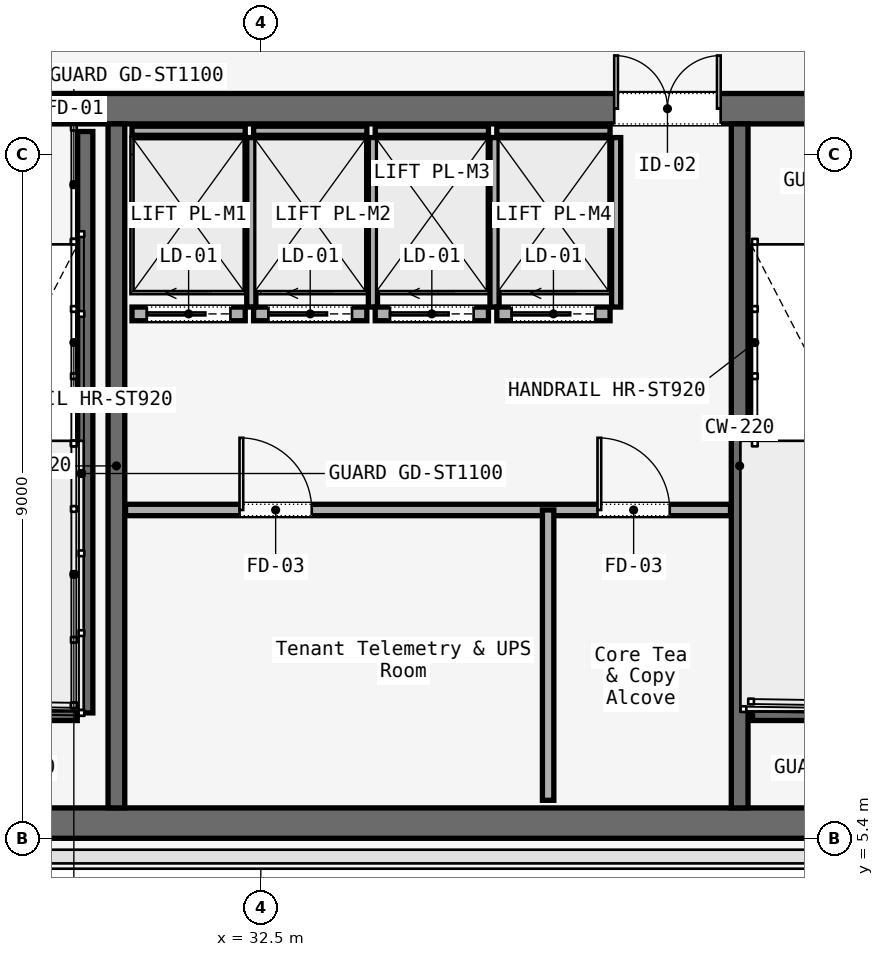
"""IFC4 building model, lengths in metres.
Left out: names, types, materials, properties, quantities, classifications, styles, units other than length and angle.
Written with IfcOpenShell. Run it as: python <this file> out.ifc"""

import sys

from ifc_helpers import new_model, si_unit, direction, frame, frame_2d, origin, place, context, subcontext, project, spatial, rectangle, extrude, element, fill, save


model = new_model("IFC4")
c1 = context("Model", 3, precision=1e-05, world=origin(), true_north=direction((0.0, 1.0)))
c2 = subcontext(c1, "Body", "Model", "MODEL_VIEW")
j1 = project(units=[si_unit("LENGTHUNIT", "METRE"), si_unit("PLANEANGLEUNIT", "RADIAN")], contexts=[c1])
p1 = place(None, origin())
s1 = spatial("IfcSite", under=j1, at=p1, CompositionType="ELEMENT")
p2 = place(p1, origin())
s2 = spatial("IfcBuilding", under=s1, at=p2, CompositionType="ELEMENT")
p3 = place(p2, frame((0.0, 0.0, 180.2)))
s3 = spatial("IfcBuildingStorey", under=s2, at=p3, CompositionType="ELEMENT", Elevation=180.2)
p4 = place(p3, frame((26.45, 15.0, 0.0), z_axis=(0.0, 0.0, 1.0), x_axis=(1.0, 0.0, 0.0)))
e1 = element("IfcWall", 1, at=p4, inside=s3, PredefinedType="SOLIDWALL", context=c2, shape_type="SweptSolid", body=[
    extrude(rectangle(XDim=31.1, YDim=0.4, at=frame_2d((15.55, 0.0))), origin(), (0.0, 0.0, 1.0), 3.58),
])
p5 = place(p4, frame((1.65, 0.0, 0.0)))
e2 = element("IfcOpeningElement", 2, at=p5, cuts=e1, PredefinedType="OPENING", context=c2, shape_type="SweptSolid", body=[
    extrude(rectangle(XDim=1.1, YDim=2.2, at=frame_2d((0.55, 1.1))), frame((0.0, 0.2, 0.0), z_axis=(0.0, -1.0, 0.0), x_axis=(1.0, 0.0, 0.0)), (0.0, 0.0, 1.0), 0.4),
])
p6 = place(p4, frame((13.65, 0.0, 0.0)))
e3 = element("IfcOpeningElement", 3, at=p6, cuts=e1, PredefinedType="OPENING", context=c2, shape_type="SweptSolid", body=[
    extrude(rectangle(XDim=1.1, YDim=2.2, at=frame_2d((0.55, 1.1))), frame((0.0, 0.2, 0.0), z_axis=(0.0, -1.0, 0.0), x_axis=(1.0, 0.0, 0.0)), (0.0, 0.0, 1.0), 0.4),
])
p7 = place(p4, frame((25.55, 0.0, 0.0)))
e4 = element("IfcOpeningElement", 4, at=p7, cuts=e1, PredefinedType="OPENING", context=c2, shape_type="SweptSolid", body=[
    extrude(rectangle(XDim=1.1, YDim=2.2, at=frame_2d((0.55, 1.1))), frame((0.0, 0.2, 0.0), z_axis=(0.0, -1.0, 0.0), x_axis=(1.0, 0.0, 0.0)), (0.0, 0.0, 1.0), 0.4),
])
p8 = place(p4, frame((10.7, 0.0, 0.0)))
e5 = element("IfcOpeningElement", 5, at=p8, cuts=e1, PredefinedType="OPENING", context=c2, shape_type="SweptSolid", body=[
    extrude(rectangle(XDim=1.4, YDim=2.2, at=frame_2d((0.7, 1.1))), frame((0.0, 0.2, 0.0), z_axis=(0.0, -1.0, 0.0), x_axis=(1.0, 0.0, 0.0)), (0.0, 0.0, 1.0), 0.4),
])
p9 = place(p4, frame((19.35, 0.0, 0.0)))
e6 = element("IfcOpeningElement", 6, at=p9, cuts=e1, PredefinedType="OPENING", context=c2, shape_type="SweptSolid", body=[
    extrude(rectangle(XDim=1.1, YDim=2.2, at=frame_2d((0.55, 1.1))), frame((0.0, 0.2, 0.0), z_axis=(0.0, -1.0, 0.0), x_axis=(1.0, 0.0, 0.0)), (0.0, 0.0, 1.0), 0.4),
])
p10 = place(p4, frame((21.4, 0.0, 0.0)))
e7 = element("IfcOpeningElement", 7, at=p10, cuts=e1, PredefinedType="OPENING", context=c2, shape_type="SweptSolid", body=[
    extrude(rectangle(XDim=0.9, YDim=2.1, at=frame_2d((0.45, 1.05))), frame((0.0, 0.2, 0.0), z_axis=(0.0, -1.0, 0.0), x_axis=(1.0, 0.0, 0.0)), (0.0, 0.0, 1.0), 0.4),
])
p11 = place(p4, frame((23.35, 0.0, 0.0)))
e8 = element("IfcOpeningElement", 8, at=p11, cuts=e1, PredefinedType="OPENING", context=c2, shape_type="SweptSolid", body=[
    extrude(rectangle(XDim=1.3, YDim=2.3, at=frame_2d((0.65, 1.15))), frame((0.0, 0.2, 0.0), z_axis=(0.0, -1.0, 0.0), x_axis=(1.0, 0.0, 0.0)), (0.0, 0.0, 1.0), 0.4),
])
p12 = place(p3, frame((26.45, 5.6, 0.0), z_axis=(0.0, 0.0, 1.0), x_axis=(1.0, 0.0, 0.0)))
e9 = element("IfcWall", 9, at=p12, inside=s3, PredefinedType="SOLIDWALL", context=c2, shape_type="SweptSolid", body=[
    extrude(rectangle(XDim=31.1, YDim=0.4, at=frame_2d((15.55, 0.0))), origin(), (0.0, 0.0, 1.0), 3.58),
])
for number, where, z_axis, x_axis in (
    (10, (30.6, 5.8, 0.0), (0.0, 0.0, 1.0), (0.0, 1.0, 0.0)),
    (11, (38.8, 5.8, 0.0), (0.0, 0.0, 1.0), (0.0, 1.0, 0.0)),
):
    element("IfcWall", number, at=place(p3, frame(where, z_axis=z_axis, x_axis=x_axis)), inside=s3, PredefinedType="SOLIDWALL", context=c2, shape_type="SweptSolid", body=[
        extrude(rectangle(XDim=9.0, YDim=0.22, at=frame_2d((4.5, 0.0))), origin(), (0.0, 0.0, 1.0), 3.58),
    ])
p13 = place(p3, frame((30.19, 14.7, 0.0), z_axis=(0.0, 0.0, 1.0), x_axis=(0.0, -1.0, 0.0)))
e12 = element("IfcWall", 12, at=p13, inside=s3, PredefinedType="SOLIDWALL", context=c2, shape_type="SweptSolid", body=[
    extrude(rectangle(XDim=7.65, YDim=0.2, at=frame_2d((3.825, 0.0))), origin(), (0.0, 0.0, 1.0), 3.8),
])
for number, where, z_axis, x_axis in (
    (13, (26.97, 7.05, 0.0), (0.0, 0.0, 1.0), (1.0, 0.0, 0.0)),
    (14, (38.97, 7.05, 0.0), (0.0, 0.0, 1.0), (1.0, 0.0, 0.0)),
):
    element("IfcWall", number, at=place(p3, frame(where, z_axis=z_axis, x_axis=x_axis)), inside=s3, PredefinedType="SOLIDWALL", context=c2, shape_type="SweptSolid", body=[
        extrude(rectangle(XDim=3.115, YDim=0.2, at=frame_2d((1.558, 0.0))), origin(), (0.0, 0.0, 1.0), 3.8),
    ])
p14 = place(p3, frame((30.72, 9.72, 0.0), z_axis=(0.0, 0.0, 1.0), x_axis=(1.0, 0.0, 0.0)))
e15 = element("IfcWall", 15, at=p14, inside=s3, PredefinedType="PARTITIONING", context=c2, shape_type="SweptSolid", body=[
    extrude(rectangle(XDim=7.96, YDim=0.15, at=frame_2d((3.98, 0.0))), origin(), (0.0, 0.0, 1.0), 3.01),
])
p15 = place(p14, frame((1.5, 0.0, 0.0)))
e16 = element("IfcOpeningElement", 16, at=p15, cuts=e15, PredefinedType="OPENING", context=c2, shape_type="SweptSolid", body=[
    extrude(rectangle(XDim=0.95, YDim=2.2, at=frame_2d((0.475, 1.1))), frame((0.0, 0.075, 0.0), z_axis=(0.0, -1.0, 0.0), x_axis=(1.0, 0.0, 0.0)), (0.0, 0.0, 1.0), 0.15),
])
p16 = place(p14, frame((6.21, 0.0, 0.0)))
e17 = element("IfcOpeningElement", 17, at=p16, cuts=e15, PredefinedType="OPENING", context=c2, shape_type="SweptSolid", body=[
    extrude(rectangle(XDim=0.95, YDim=2.2, at=frame_2d((0.475, 1.1))), frame((0.0, 0.075, 0.0), z_axis=(0.0, -1.0, 0.0), x_axis=(1.0, 0.0, 0.0)), (0.0, 0.0, 1.0), 0.15),
])
p17 = place(p3, frame((36.28, 5.9, 0.0), z_axis=(0.0, 0.0, 1.0), x_axis=(0.0, 1.0, 0.0)))
e18 = element("IfcWall", 18, at=p17, inside=s3, PredefinedType="PARTITIONING", context=c2, shape_type="SweptSolid", body=[
    extrude(rectangle(XDim=3.82, YDim=0.15, at=frame_2d((1.91, 0.0))), origin(), (0.0, 0.0, 1.0), 3.01),
])
p18 = place(p3, frame((30.805, 12.3, 0.0), z_axis=(0.0, 0.0, 1.0), x_axis=(1.0, 0.0, 0.0)))
e19 = element("IfcWall", 19, at=p18, inside=s3, PredefinedType="SOLIDWALL", context=c2, shape_type="SweptSolid", body=[
    extrude(rectangle(XDim=1.49, YDim=0.18, at=frame_2d((0.745, 0.0))), origin(), (0.0, 0.0, 1.0), 3.01),
])
p19 = place(p18, frame((0.195, 0.0, 0.0)))
e20 = element("IfcOpeningElement", 20, at=p19, cuts=e19, PredefinedType="OPENING", context=c2, shape_type="SweptSolid", body=[
    extrude(rectangle(XDim=1.1, YDim=2.2, at=frame_2d((0.55, 1.1))), frame((0.0, 0.09, 0.0), z_axis=(0.0, -1.0, 0.0), x_axis=(1.0, 0.0, 0.0)), (0.0, 0.0, 1.0), 0.18),
])
p20 = place(p3, frame((30.805, 14.71, 0.0), z_axis=(0.0, 0.0, 1.0), x_axis=(1.0, 0.0, 0.0)))
e21 = element("IfcWall", 21, at=p20, inside=s3, PredefinedType="SOLIDWALL", context=c2, shape_type="SweptSolid", body=[
    extrude(rectangle(XDim=1.49, YDim=0.12, at=frame_2d((0.745, 0.0))), origin(), (0.0, 0.0, 1.0), 3.01),
])
p21 = place(p3, frame((32.375, 12.39, 0.0), z_axis=(0.0, 0.0, 1.0), x_axis=(0.0, 1.0, 0.0)))
e22 = element("IfcWall", 22, at=p21, inside=s3, PredefinedType="SOLIDWALL", context=c2, shape_type="SweptSolid", body=[
    extrude(rectangle(XDim=2.23, YDim=0.12, at=frame_2d((1.115, 0.0))), origin(), (0.0, 0.0, 1.0), 3.01),
])
p22 = place(p3, frame((32.405, 12.3, 0.0), z_axis=(0.0, 0.0, 1.0), x_axis=(1.0, 0.0, 0.0)))
e23 = element("IfcWall", 23, at=p22, inside=s3, PredefinedType="SOLIDWALL", context=c2, shape_type="SweptSolid", body=[
    extrude(rectangle(XDim=1.49, YDim=0.18, at=frame_2d((0.745, 0.0))), origin(), (0.0, 0.0, 1.0), 3.01),
])
p23 = place(p22, frame((0.195, 0.0, 0.0)))
e24 = element("IfcOpeningElement", 24, at=p23, cuts=e23, PredefinedType="OPENING", context=c2, shape_type="SweptSolid", body=[
    extrude(rectangle(XDim=1.1, YDim=2.2, at=frame_2d((0.55, 1.1))), frame((0.0, 0.09, 0.0), z_axis=(0.0, -1.0, 0.0), x_axis=(1.0, 0.0, 0.0)), (0.0, 0.0, 1.0), 0.18),
])
p24 = place(p3, frame((32.405, 14.71, 0.0), z_axis=(0.0, 0.0, 1.0), x_axis=(1.0, 0.0, 0.0)))
e25 = element("IfcWall", 25, at=p24, inside=s3, PredefinedType="SOLIDWALL", context=c2, shape_type="SweptSolid", body=[
    extrude(rectangle(XDim=1.49, YDim=0.12, at=frame_2d((0.745, 0.0))), origin(), (0.0, 0.0, 1.0), 3.01),
])
p25 = place(p3, frame((33.975, 12.39, 0.0), z_axis=(0.0, 0.0, 1.0), x_axis=(0.0, 1.0, 0.0)))
e26 = element("IfcWall", 26, at=p25, inside=s3, PredefinedType="SOLIDWALL", context=c2, shape_type="SweptSolid", body=[
    extrude(rectangle(XDim=2.23, YDim=0.12, at=frame_2d((1.115, 0.0))), origin(), (0.0, 0.0, 1.0), 3.01),
])
p26 = place(p3, frame((34.005, 12.3, 0.0), z_axis=(0.0, 0.0, 1.0), x_axis=(1.0, 0.0, 0.0)))
e27 = element("IfcWall", 27, at=p26, inside=s3, PredefinedType="SOLIDWALL", context=c2, shape_type="SweptSolid", body=[
    extrude(rectangle(XDim=1.49, YDim=0.18, at=frame_2d((0.745, 0.0))), origin(), (0.0, 0.0, 1.0), 3.01),
])
p27 = place(p26, frame((0.195, 0.0, 0.0)))
e28 = element("IfcOpeningElement", 28, at=p27, cuts=e27, PredefinedType="OPENING", context=c2, shape_type="SweptSolid", body=[
    extrude(rectangle(XDim=1.1, YDim=2.2, at=frame_2d((0.55, 1.1))), frame((0.0, 0.09, 0.0), z_axis=(0.0, -1.0, 0.0), x_axis=(1.0, 0.0, 0.0)), (0.0, 0.0, 1.0), 0.18),
])
p28 = place(p3, frame((34.005, 14.71, 0.0), z_axis=(0.0, 0.0, 1.0), x_axis=(1.0, 0.0, 0.0)))
e29 = element("IfcWall", 29, at=p28, inside=s3, PredefinedType="SOLIDWALL", context=c2, shape_type="SweptSolid", body=[
    extrude(rectangle(XDim=1.49, YDim=0.12, at=frame_2d((0.745, 0.0))), origin(), (0.0, 0.0, 1.0), 3.01),
])
p29 = place(p3, frame((35.575, 12.39, 0.0), z_axis=(0.0, 0.0, 1.0), x_axis=(0.0, 1.0, 0.0)))
e30 = element("IfcWall", 30, at=p29, inside=s3, PredefinedType="SOLIDWALL", context=c2, shape_type="SweptSolid", body=[
    extrude(rectangle(XDim=2.23, YDim=0.12, at=frame_2d((1.115, 0.0))), origin(), (0.0, 0.0, 1.0), 3.01),
])
p30 = place(p3, frame((35.605, 12.3, 0.0), z_axis=(0.0, 0.0, 1.0), x_axis=(1.0, 0.0, 0.0)))
e31 = element("IfcWall", 31, at=p30, inside=s3, PredefinedType="SOLIDWALL", context=c2, shape_type="SweptSolid", body=[
    extrude(rectangle(XDim=1.49, YDim=0.18, at=frame_2d((0.745, 0.0))), origin(), (0.0, 0.0, 1.0), 3.01),
])
p31 = place(p30, frame((0.195, 0.0, 0.0)))
e32 = element("IfcOpeningElement", 32, at=p31, cuts=e31, PredefinedType="OPENING", context=c2, shape_type="SweptSolid", body=[
    extrude(rectangle(XDim=1.1, YDim=2.2, at=frame_2d((0.55, 1.1))), frame((0.0, 0.09, 0.0), z_axis=(0.0, -1.0, 0.0), x_axis=(1.0, 0.0, 0.0)), (0.0, 0.0, 1.0), 0.18),
])
p32 = place(p3, frame((35.605, 14.71, 0.0), z_axis=(0.0, 0.0, 1.0), x_axis=(1.0, 0.0, 0.0)))
e33 = element("IfcWall", 33, at=p32, inside=s3, PredefinedType="SOLIDWALL", context=c2, shape_type="SweptSolid", body=[
    extrude(rectangle(XDim=1.49, YDim=0.12, at=frame_2d((0.745, 0.0))), origin(), (0.0, 0.0, 1.0), 3.01),
])
p33 = place(p3, frame((37.175, 12.39, 0.0), z_axis=(0.0, 0.0, 1.0), x_axis=(0.0, 1.0, 0.0)))
e34 = element("IfcWall", 34, at=p33, inside=s3, PredefinedType="SOLIDWALL", context=c2, shape_type="SweptSolid", body=[
    extrude(rectangle(XDim=2.23, YDim=0.12, at=frame_2d((1.115, 0.0))), origin(), (0.0, 0.0, 1.0), 3.01),
])
p34 = place(p8, origin())
e35 = element("IfcDoor", 35, at=p34, inside=s3, OperationType="DOUBLE_DOOR_SINGLE_SWING", PredefinedType="DOOR", context=c2, shape_type="SweptSolid", body=[
    extrude(rectangle(XDim=1.4, YDim=2.2, at=frame_2d((0.7, 1.1))), frame((0.0, 0.025, 0.0), z_axis=(0.0, -1.0, 0.0), x_axis=(1.0, 0.0, 0.0)), (0.0, 0.0, 1.0), 0.05),
])
fill(e5, e35)
p35 = place(p15, origin())
e36 = element("IfcDoor", 36, at=p35, inside=s3, OperationType="SINGLE_SWING_LEFT", PredefinedType="DOOR", context=c2, shape_type="SweptSolid", body=[
    extrude(rectangle(XDim=0.95, YDim=2.2, at=frame_2d((0.475, 1.1))), frame((0.0, 0.025, 0.0), z_axis=(0.0, -1.0, 0.0), x_axis=(1.0, 0.0, 0.0)), (0.0, 0.0, 1.0), 0.05),
])
fill(e16, e36)
p36 = place(p16, origin())
e37 = element("IfcDoor", 37, at=p36, inside=s3, OperationType="SINGLE_SWING_RIGHT", PredefinedType="DOOR", context=c2, shape_type="SweptSolid", body=[
    extrude(rectangle(XDim=0.95, YDim=2.2, at=frame_2d((0.475, 1.1))), frame((0.0, 0.025, 0.0), z_axis=(0.0, -1.0, 0.0), x_axis=(1.0, 0.0, 0.0)), (0.0, 0.0, 1.0), 0.05),
])
fill(e17, e37)
p37 = place(p19, origin())
e38 = element("IfcDoor", 38, at=p37, inside=s3, OperationType="SLIDING_TO_LEFT", PredefinedType="DOOR", context=c2, shape_type="SweptSolid", body=[
    extrude(rectangle(XDim=1.1, YDim=2.2, at=frame_2d((0.55, 1.1))), frame((0.0, 0.025, 0.0), z_axis=(0.0, -1.0, 0.0), x_axis=(1.0, 0.0, 0.0)), (0.0, 0.0, 1.0), 0.05),
])
fill(e20, e38)
p38 = place(p23, origin())
e39 = element("IfcDoor", 39, at=p38, inside=s3, OperationType="SLIDING_TO_LEFT", PredefinedType="DOOR", context=c2, shape_type="SweptSolid", body=[
    extrude(rectangle(XDim=1.1, YDim=2.2, at=frame_2d((0.55, 1.1))), frame((0.0, 0.025, 0.0), z_axis=(0.0, -1.0, 0.0), x_axis=(1.0, 0.0, 0.0)), (0.0, 0.0, 1.0), 0.05),
])
fill(e24, e39)
p39 = place(p27, origin())
e40 = element("IfcDoor", 40, at=p39, inside=s3, OperationType="SLIDING_TO_LEFT", PredefinedType="DOOR", context=c2, shape_type="SweptSolid", body=[
    extrude(rectangle(XDim=1.1, YDim=2.2, at=frame_2d((0.55, 1.1))), frame((0.0, 0.025, 0.0), z_axis=(0.0, -1.0, 0.0), x_axis=(1.0, 0.0, 0.0)), (0.0, 0.0, 1.0), 0.05),
])
fill(e28, e40)
p40 = place(p31, origin())
e41 = element("IfcDoor", 41, at=p40, inside=s3, OperationType="SLIDING_TO_LEFT", PredefinedType="DOOR", context=c2, shape_type="SweptSolid", body=[
    extrude(rectangle(XDim=1.1, YDim=2.2, at=frame_2d((0.55, 1.1))), frame((0.0, 0.025, 0.0), z_axis=(0.0, -1.0, 0.0), x_axis=(1.0, 0.0, 0.0)), (0.0, 0.0, 1.0), 0.05),
])
fill(e32, e41)
save(model, sys.argv[1])
